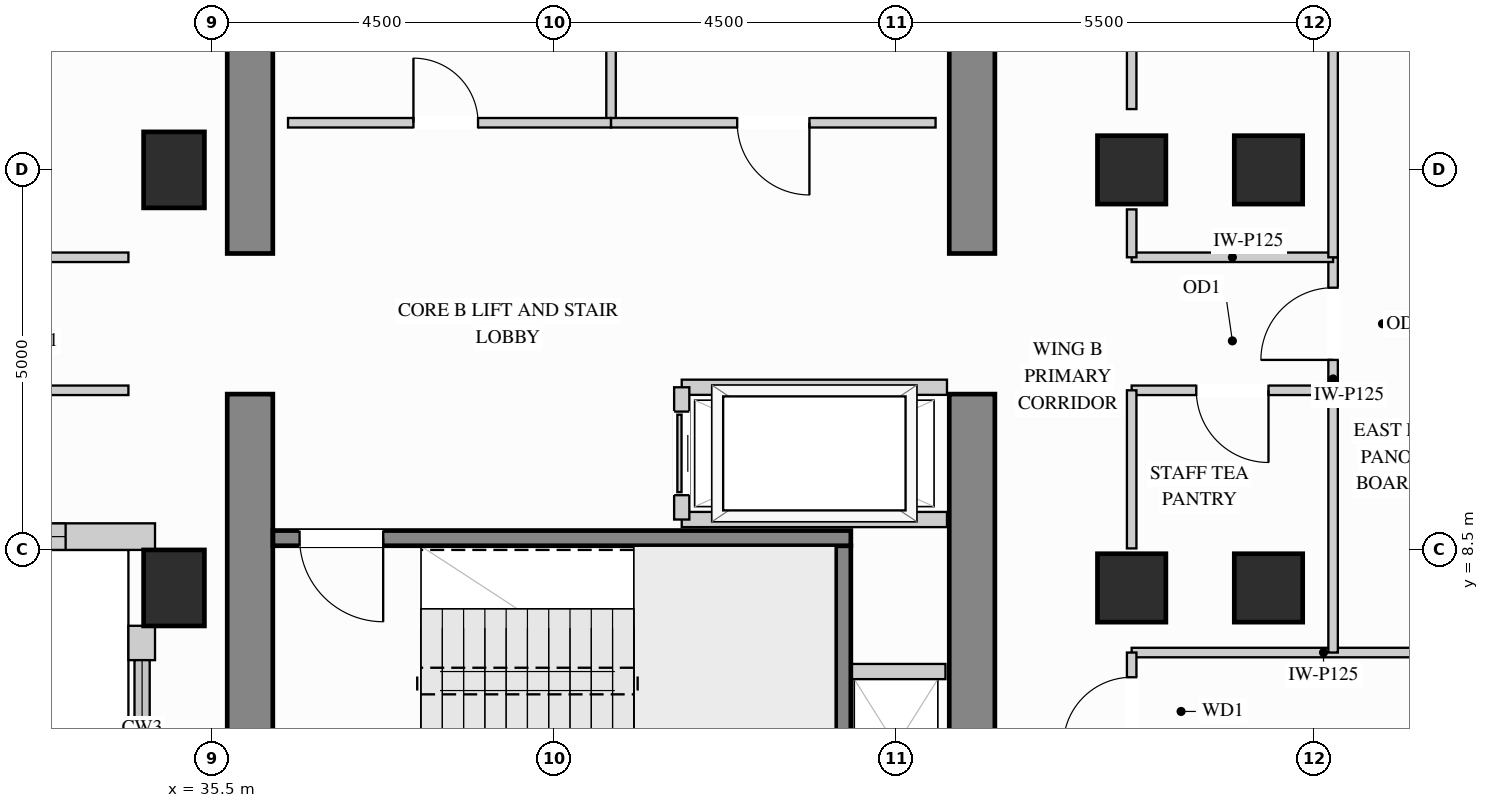
"""IFC4 building model, lengths in metres.
Left out: names, types, materials, properties, quantities, classifications, styles, units other than length and angle.
Written with IfcOpenShell. Run it as: python <this file> out.ifc"""

import sys

from ifc_helpers import new_model, si_unit, direction, frame, frame_2d, origin, origin_2d, place, context, subcontext, project, spatial, rectangle, extrude, source, transform, mapped, element, fill, save


model = new_model("IFC4")
c1 = context("Model", 3, precision=1e-05, world=origin(), true_north=direction((0.0, 1.0)))
c2 = subcontext(c1, "Body", "Model", "MODEL_VIEW")
j1 = project(units=[si_unit("LENGTHUNIT", "METRE"), si_unit("PLANEANGLEUNIT", "RADIAN")], contexts=[c1])
p1 = place(None, origin())
s1 = spatial("IfcSite", under=j1, at=p1, CompositionType="ELEMENT")
p2 = place(p1, origin())
s2 = spatial("IfcBuilding", under=s1, at=p2, CompositionType="ELEMENT")
p3 = place(p2, frame((0.0, 0.0, 161.1)))
s3 = spatial("IfcBuildingStorey", under=s2, at=p3, CompositionType="ELEMENT", Elevation=161.1)
m1 = source(origin(), c2, "Body", "SweptSolid", [
    extrude(rectangle(XDim=0.9, YDim=0.9, at=origin_2d()), origin(), (0.0, 0.0, 1.0), 3.4),
])
for number, where, z_axis, x_axis in (
    (1, (47.6, 13.5, 0.0), (0.0, 0.0, 1.0), (1.0, 0.0, 0.0)),
    (2, (47.6, 8.0, 0.0), (0.0, 0.0, 1.0), (1.0, 0.0, 0.0)),
    (3, (49.4, 13.5, 0.0), (0.0, 0.0, 1.0), (1.0, 0.0, 0.0)),
    (4, (49.4, 8.0, 0.0), (0.0, 0.0, 1.0), (1.0, 0.0, 0.0)),
):
    element("IfcColumn", number, at=place(p3, frame(where, z_axis=z_axis, x_axis=x_axis)), inside=s3, PredefinedType="COLUMN", context=c2, shape_type="MappedRepresentation", body=[
        mapped(m1, transform((0.0, 0.0, 0.0), x_axis=(1.0, 0.0, 0.0), y_axis=(0.0, 1.0, 0.0), z_axis=(0.0, 0.0, 1.0))),
    ])
m2 = source(origin(), c2, "Body", "SweptSolid", [
    extrude(rectangle(XDim=0.8, YDim=1.0, at=origin_2d()), origin(), (0.0, 0.0, 1.0), 3.4),
])
for number, where, z_axis, x_axis in (
    (5, (35.0, 13.5, 0.0), (0.0, 0.0, 1.0), (1.0, 0.0, 0.0)),
    (6, (35.0, 8.0, 0.0), (0.0, 0.0, 1.0), (1.0, 0.0, 0.0)),
):
    element("IfcColumn", number, at=place(p3, frame(where, z_axis=z_axis, x_axis=x_axis)), inside=s3, PredefinedType="COLUMN", context=c2, shape_type="MappedRepresentation", body=[
        mapped(m2, transform((0.0, 0.0, 0.0), x_axis=(1.0, 0.0, 0.0), y_axis=(0.0, 1.0, 0.0), z_axis=(0.0, 0.0, 1.0))),
    ])
m3 = source(origin(), c2, "Body", "SweptSolid", [
    extrude(rectangle(XDim=5.75, YDim=0.6, at=frame_2d((2.875, 0.0))), origin(), (0.0, 0.0, 1.0), 3.4),
])
p4 = place(p3, frame((45.5, 4.8, 0.0), z_axis=(0.0, 0.0, 1.0), x_axis=(0.0, 1.0, 0.0)))
e7 = element("IfcWall", 7, at=p4, inside=s3, PredefinedType="SHEAR", context=c2, shape_type="MappedRepresentation", body=[
    mapped(m3, transform((0.0, 0.0, 0.0), x_axis=(1.0, 0.0, 0.0), y_axis=(0.0, 1.0, 0.0), z_axis=(0.0, 0.0, 1.0))),
])
m4 = source(origin(), c2, "Body", "SweptSolid", [
    extrude(rectangle(XDim=3.8, YDim=0.6, at=frame_2d((1.9, 0.0))), origin(), (0.0, 0.0, 1.0), 3.4),
])
p5 = place(p3, frame((45.5, 12.4, 0.0), z_axis=(0.0, 0.0, 1.0), x_axis=(0.0, 1.0, 0.0)))
e8 = element("IfcWall", 8, at=p5, inside=s3, PredefinedType="SHEAR", context=c2, shape_type="MappedRepresentation", body=[
    mapped(m4, transform((0.0, 0.0, 0.0), x_axis=(1.0, 0.0, 0.0), y_axis=(0.0, 1.0, 0.0), z_axis=(0.0, 0.0, 1.0))),
])
p6 = place(p3, frame((36.0, 4.8, 0.0), z_axis=(0.0, 0.0, 1.0), x_axis=(0.0, 1.0, 0.0)))
e9 = element("IfcWall", 9, at=p6, inside=s3, PredefinedType="SHEAR", context=c2, shape_type="MappedRepresentation", body=[
    mapped(m3, transform((0.0, 0.0, 0.0), x_axis=(1.0, 0.0, 0.0), y_axis=(0.0, 1.0, 0.0), z_axis=(0.0, 0.0, 1.0))),
])
p7 = place(p3, frame((36.0, 12.4, 0.0), z_axis=(0.0, 0.0, 1.0), x_axis=(0.0, 1.0, 0.0)))
e10 = element("IfcWall", 10, at=p7, inside=s3, PredefinedType="SHEAR", context=c2, shape_type="MappedRepresentation", body=[
    mapped(m4, transform((0.0, 0.0, 0.0), x_axis=(1.0, 0.0, 0.0), y_axis=(0.0, 1.0, 0.0), z_axis=(0.0, 0.0, 1.0))),
])
p8 = place(p3, frame((30.898, 8.675, 0.0), z_axis=(0.0, 0.0, 1.0), x_axis=(1.0, 0.0, 0.0)))
e11 = element("IfcWall", 11, at=p8, inside=s3, PredefinedType="SOLIDWALL", context=c2, shape_type="SweptSolid", body=[
    extrude(rectangle(XDim=3.852, YDim=0.35, at=frame_2d((1.926, 0.0))), origin(), (0.0, 0.0, 1.0), 3.385),
])
p9 = place(p8, frame((1.176, 0.0, 0.78)))
e12 = element("IfcOpeningElement", 12, at=p9, cuts=e11, PredefinedType="OPENING", context=c2, shape_type="SweptSolid", body=[
    extrude(rectangle(XDim=1.5, YDim=2.0, at=frame_2d((0.75, 1.0))), frame((0.0, 0.185, 0.0), z_axis=(0.0, -1.0, 0.0), x_axis=(1.0, 0.0, 0.0)), (0.0, 0.0, 1.0), 0.37),
])
m5 = source(origin(), c2, "Body", "SweptSolid", [
    extrude(rectangle(XDim=0.452, YDim=0.35, at=frame_2d((0.226, 0.0))), origin(), (0.0, 0.0, 1.0), 2.612),
])
p10 = place(p3, frame((34.575, 7.502, 0.0), z_axis=(0.0, 0.0, 1.0), x_axis=(0.0, -1.0, 0.0)))
e13 = element("IfcWall", 13, at=p10, inside=s3, PredefinedType="SOLIDWALL", context=c2, shape_type="MappedRepresentation", body=[
    mapped(m5, transform((0.0, 0.0, 0.0), x_axis=(1.0, 0.0, 0.0), y_axis=(0.0, 1.0, 0.0), z_axis=(0.0, 0.0, 1.0))),
])
m6 = source(origin(), c2, "Body", "SweptSolid", [
    extrude(rectangle(XDim=1.93, YDim=0.125, at=frame_2d((0.965, 0.0))), origin(), (0.0, 0.0, 1.0), 3.385),
])
p11 = place(p3, frame((40.75, 14.12, 0.0), z_axis=(0.0, 0.0, 1.0), x_axis=(0.0, 1.0, 0.0)))
e14 = element("IfcWall", 14, at=p11, inside=s3, PredefinedType="PARTITIONING", context=c2, shape_type="MappedRepresentation", body=[
    mapped(m6, transform((0.0, 0.0, 0.0), x_axis=(1.0, 0.0, 0.0), y_axis=(0.0, 1.0, 0.0), z_axis=(0.0, 0.0, 1.0))),
])
p12 = place(p3, frame((36.5, 14.12, 0.0), z_axis=(0.0, 0.0, 1.0), x_axis=(1.0, 0.0, 0.0)))
e15 = element("IfcWall", 15, at=p12, inside=s3, PredefinedType="PARTITIONING", context=c2, shape_type="SweptSolid", body=[
    extrude(rectangle(XDim=4.25, YDim=0.125, at=frame_2d((2.125, 0.0))), origin(), (0.0, 0.0, 1.0), 3.385),
])
p13 = place(p12, frame((1.65, 0.0, 0.0)))
e16 = element("IfcOpeningElement", 16, at=p13, cuts=e15, PredefinedType="OPENING", context=c2, shape_type="SweptSolid", body=[
    extrude(rectangle(XDim=0.85, YDim=2.1, at=frame_2d((0.425, 1.05))), frame((0.0, 0.073, 0.0), z_axis=(0.0, -1.0, 0.0), x_axis=(1.0, 0.0, 0.0)), (0.0, 0.0, 1.0), 0.145),
])
p14 = place(p3, frame((40.75, 14.12, 0.0), z_axis=(0.0, 0.0, 1.0), x_axis=(1.0, 0.0, 0.0)))
e17 = element("IfcWall", 17, at=p14, inside=s3, PredefinedType="PARTITIONING", context=c2, shape_type="SweptSolid", body=[
    extrude(rectangle(XDim=4.27, YDim=0.125, at=frame_2d((2.135, 0.0))), origin(), (0.0, 0.0, 1.0), 3.385),
])
p15 = place(p14, frame((1.66, 0.0, 0.0)))
e18 = element("IfcOpeningElement", 18, at=p15, cuts=e17, PredefinedType="OPENING", context=c2, shape_type="SweptSolid", body=[
    extrude(rectangle(XDim=0.95, YDim=2.15, at=frame_2d((0.475, 1.075))), frame((0.0, 0.073, 0.0), z_axis=(0.0, -1.0, 0.0), x_axis=(1.0, 0.0, 0.0)), (0.0, 0.0, 1.0), 0.145),
])
p16 = place(p3, frame((50.25, 10.6, 0.0), z_axis=(0.0, 0.0, 1.0), x_axis=(0.0, 1.0, 0.0)))
e19 = element("IfcWall", 19, at=p16, inside=s3, PredefinedType="PARTITIONING", context=c2, shape_type="SweptSolid", body=[
    extrude(rectangle(XDim=1.75, YDim=0.125, at=frame_2d((0.875, 0.0))), origin(), (0.0, 0.0, 1.0), 3.385),
])
p17 = place(p16, frame((0.4, 0.0, 0.0)))
e20 = element("IfcOpeningElement", 20, at=p17, cuts=e19, PredefinedType="OPENING", context=c2, shape_type="SweptSolid", body=[
    extrude(rectangle(XDim=0.95, YDim=2.15, at=frame_2d((0.475, 1.075))), frame((0.0, 0.073, 0.0), z_axis=(0.0, -1.0, 0.0), x_axis=(1.0, 0.0, 0.0)), (0.0, 0.0, 1.0), 0.145),
])
m7 = source(origin(), c2, "Body", "SweptSolid", [
    extrude(rectangle(XDim=5.048, YDim=0.125, at=frame_2d((2.524, 0.0))), origin(), (0.0, 0.0, 1.0), 3.385),
])
p18 = place(p3, frame((47.6, 7.15, 0.0), z_axis=(0.0, 0.0, 1.0), x_axis=(1.0, 0.0, 0.0)))
e21 = element("IfcWall", 21, at=p18, inside=s3, PredefinedType="PARTITIONING", context=c2, shape_type="MappedRepresentation", body=[
    mapped(m7, transform((0.0, 0.0, 0.0), x_axis=(1.0, 0.0, 0.0), y_axis=(0.0, 1.0, 0.0), z_axis=(0.0, 0.0, 1.0))),
])
m8 = source(origin(), c2, "Body", "SweptSolid", [
    extrude(rectangle(XDim=2.65, YDim=0.125, at=frame_2d((1.325, 0.0))), origin(), (0.0, 0.0, 1.0), 3.385),
])
p19 = place(p3, frame((47.6, 12.35, 0.0), z_axis=(0.0, 0.0, 1.0), x_axis=(1.0, 0.0, 0.0)))
e22 = element("IfcWall", 22, at=p19, inside=s3, PredefinedType="PARTITIONING", context=c2, shape_type="MappedRepresentation", body=[
    mapped(m8, transform((0.0, 0.0, 0.0), x_axis=(1.0, 0.0, 0.0), y_axis=(0.0, 1.0, 0.0), z_axis=(0.0, 0.0, 1.0))),
])
p20 = place(p3, frame((47.6, 10.6, 0.0), z_axis=(0.0, 0.0, 1.0), x_axis=(1.0, 0.0, 0.0)))
e23 = element("IfcWall", 23, at=p20, inside=s3, PredefinedType="PARTITIONING", context=c2, shape_type="SweptSolid", body=[
    extrude(rectangle(XDim=2.65, YDim=0.125, at=frame_2d((1.325, 0.0))), origin(), (0.0, 0.0, 1.0), 2.773),
])
p21 = place(p20, frame((0.85, 0.0, 0.0)))
e24 = element("IfcOpeningElement", 24, at=p21, cuts=e23, PredefinedType="OPENING", context=c2, shape_type="SweptSolid", body=[
    extrude(rectangle(XDim=0.95, YDim=2.15, at=frame_2d((0.475, 1.075))), frame((0.0, 0.073, 0.0), z_axis=(0.0, -1.0, 0.0), x_axis=(1.0, 0.0, 0.0)), (0.0, 0.0, 1.0), 0.145),
])
m9 = source(origin(), c2, "Body", "SweptSolid", [
    extrude(rectangle(XDim=3.45, YDim=0.125, at=frame_2d((1.725, 0.0))), origin(), (0.0, 0.0, 1.0), 3.385),
])
p22 = place(p3, frame((50.25, 7.15, 0.0), z_axis=(0.0, 0.0, 1.0), x_axis=(0.0, 1.0, 0.0)))
e25 = element("IfcWall", 25, at=p22, inside=s3, PredefinedType="PARTITIONING", context=c2, shape_type="MappedRepresentation", body=[
    mapped(m9, transform((0.0, 0.0, 0.0), x_axis=(1.0, 0.0, 0.0), y_axis=(0.0, 1.0, 0.0), z_axis=(0.0, 0.0, 1.0))),
])
m10 = source(origin(), c2, "Body", "SweptSolid", [
    extrude(rectangle(XDim=2.798, YDim=0.125, at=frame_2d((1.399, 0.0))), origin(), (0.0, 0.0, 1.0), 3.385),
])
p23 = place(p3, frame((50.25, 12.35, 0.0), z_axis=(0.0, 0.0, 1.0), x_axis=(0.0, 1.0, 0.0)))
e26 = element("IfcWall", 26, at=p23, inside=s3, PredefinedType="PARTITIONING", context=c2, shape_type="MappedRepresentation", body=[
    mapped(m10, transform((0.0, 0.0, 0.0), x_axis=(1.0, 0.0, 0.0), y_axis=(0.0, 1.0, 0.0), z_axis=(0.0, 0.0, 1.0))),
])
m11 = source(origin(), c2, "Body", "SweptSolid", [
    extrude(rectangle(XDim=2.08, YDim=0.125, at=frame_2d((1.04, 0.0))), origin(), (0.0, 0.0, 1.0), 2.773),
])
p24 = place(p3, frame((47.6, 8.52, 0.0), z_axis=(0.0, 0.0, 1.0), x_axis=(0.0, 1.0, 0.0)))
e27 = element("IfcWall", 27, at=p24, inside=s3, PredefinedType="PARTITIONING", context=c2, shape_type="MappedRepresentation", body=[
    mapped(m11, transform((0.0, 0.0, 0.0), x_axis=(1.0, 0.0, 0.0), y_axis=(0.0, 1.0, 0.0), z_axis=(0.0, 0.0, 1.0))),
])
p25 = place(p3, frame((47.6, 14.3, 0.0), z_axis=(0.0, 0.0, 1.0), x_axis=(0.0, 1.0, 0.0)))
e28 = element("IfcWall", 28, at=p25, inside=s3, PredefinedType="PARTITIONING", context=c2, shape_type="SweptSolid", body=[
    extrude(rectangle(XDim=2.58, YDim=0.125, at=frame_2d((1.29, 0.0))), origin(), (0.0, 0.0, 1.0), 2.773),
])
p26 = place(p25, frame((1.2, 0.0, 0.0)))
e29 = element("IfcOpeningElement", 29, at=p26, cuts=e28, PredefinedType="OPENING", context=c2, shape_type="SweptSolid", body=[
    extrude(rectangle(XDim=0.95, YDim=2.15, at=frame_2d((0.475, 1.075))), frame((0.0, 0.073, 0.0), z_axis=(0.0, -1.0, 0.0), x_axis=(1.0, 0.0, 0.0)), (0.0, 0.0, 1.0), 0.145),
])
m12 = source(origin(), c2, "Body", "SweptSolid", [
    extrude(rectangle(XDim=0.63, YDim=0.125, at=frame_2d((0.315, 0.0))), origin(), (0.0, 0.0, 1.0), 2.773),
])
p27 = place(p3, frame((47.6, 12.35, 0.0), z_axis=(0.0, 0.0, 1.0), x_axis=(0.0, 1.0, 0.0)))
e30 = element("IfcWall", 30, at=p27, inside=s3, PredefinedType="PARTITIONING", context=c2, shape_type="MappedRepresentation", body=[
    mapped(m12, transform((0.0, 0.0, 0.0), x_axis=(1.0, 0.0, 0.0), y_axis=(0.0, 1.0, 0.0), z_axis=(0.0, 0.0, 1.0))),
])
p28 = place(p3, frame((47.6, 5.65, 0.0), z_axis=(0.0, 0.0, 1.0), x_axis=(0.0, 1.0, 0.0)))
e31 = element("IfcWall", 31, at=p28, inside=s3, PredefinedType="PARTITIONING", context=c2, shape_type="SweptSolid", body=[
    extrude(rectangle(XDim=1.5, YDim=0.125, at=frame_2d((0.75, 0.0))), origin(), (0.0, 0.0, 1.0), 2.773),
])
p29 = place(p28, frame((0.275, 0.0, 0.0)))
e32 = element("IfcOpeningElement", 32, at=p29, cuts=e31, PredefinedType="OPENING", context=c2, shape_type="SweptSolid", body=[
    extrude(rectangle(XDim=0.9, YDim=2.15, at=frame_2d((0.45, 1.075))), frame((0.0, 0.073, 0.0), z_axis=(0.0, -1.0, 0.0), x_axis=(1.0, 0.0, 0.0)), (0.0, 0.0, 1.0), 0.145),
])
p30 = place(p3, frame((29.85, 12.35, 0.0), z_axis=(0.0, 0.0, 1.0), x_axis=(1.0, 0.0, 0.0)))
e33 = element("IfcWall", 33, at=p30, inside=s3, PredefinedType="PARTITIONING", context=c2, shape_type="SweptSolid", body=[
    extrude(rectangle(XDim=4.55, YDim=0.125, at=frame_2d((2.275, 0.0))), origin(), (0.0, 0.0, 1.0), 3.385),
])
p31 = place(p30, frame((1.8, 0.0, 0.0)))
e34 = element("IfcOpeningElement", 34, at=p31, cuts=e33, PredefinedType="OPENING", context=c2, shape_type="SweptSolid", body=[
    extrude(rectangle(XDim=0.95, YDim=2.15, at=frame_2d((0.475, 1.075))), frame((0.0, 0.073, 0.0), z_axis=(0.0, -1.0, 0.0), x_axis=(1.0, 0.0, 0.0)), (0.0, 0.0, 1.0), 0.145),
])
p32 = place(p3, frame((29.85, 10.6, 0.0), z_axis=(0.0, 0.0, 1.0), x_axis=(1.0, 0.0, 0.0)))
e35 = element("IfcWall", 35, at=p32, inside=s3, PredefinedType="PARTITIONING", context=c2, shape_type="SweptSolid", body=[
    extrude(rectangle(XDim=4.55, YDim=0.125, at=frame_2d((2.275, 0.0))), origin(), (0.0, 0.0, 1.0), 3.385),
])
p33 = place(p32, frame((1.8, 0.0, 0.0)))
e36 = element("IfcOpeningElement", 36, at=p33, cuts=e35, PredefinedType="OPENING", context=c2, shape_type="SweptSolid", body=[
    extrude(rectangle(XDim=0.95, YDim=2.15, at=frame_2d((0.475, 1.075))), frame((0.0, 0.073, 0.0), z_axis=(0.0, -1.0, 0.0), x_axis=(1.0, 0.0, 0.0)), (0.0, 0.0, 1.0), 0.145),
])
m13 = source(origin(), c2, "Body", "SweptSolid", [
    extrude(rectangle(XDim=1.3, YDim=0.2, at=frame_2d((0.65, 0.0))), origin(), (0.0, 0.0, 1.0), 3.385),
])
p34 = place(p3, frame((43.85, 6.9, 0.0), z_axis=(0.0, 0.0, 1.0), x_axis=(1.0, 0.0, 0.0)))
e37 = element("IfcWall", 37, at=p34, inside=s3, PredefinedType="PARTITIONING", context=c2, shape_type="MappedRepresentation", body=[
    mapped(m13, transform((0.0, 0.0, 0.0), x_axis=(1.0, 0.0, 0.0), y_axis=(0.0, 1.0, 0.0), z_axis=(0.0, 0.0, 1.0))),
])
m14 = source(origin(), c2, "Body", "SweptSolid", [
    extrude(rectangle(XDim=3.49, YDim=0.2, at=frame_2d((1.745, 0.0))), origin(), (0.0, 0.0, 1.0), 3.385),
])
for number, where, z_axis, x_axis in (
    (38, (41.68, 10.64, 0.0), (0.0, 0.0, 1.0), (1.0, 0.0, 0.0)),
    (39, (41.68, 8.9, 0.0), (0.0, 0.0, 1.0), (1.0, 0.0, 0.0)),
):
    element("IfcWall", number, at=place(p3, frame(where, z_axis=z_axis, x_axis=x_axis)), inside=s3, PredefinedType="PARTITIONING", context=c2, shape_type="MappedRepresentation", body=[
        mapped(m14, transform((0.0, 0.0, 0.0), x_axis=(1.0, 0.0, 0.0), y_axis=(0.0, 1.0, 0.0), z_axis=(0.0, 0.0, 1.0))),
    ])
p35 = place(p3, frame((41.68, 8.9, 0.0), z_axis=(0.0, 0.0, 1.0), x_axis=(0.0, 1.0, 0.0)))
e40 = element("IfcWall", 40, at=p35, inside=s3, PredefinedType="PARTITIONING", context=c2, shape_type="SweptSolid", body=[
    extrude(rectangle(XDim=1.74, YDim=0.2, at=frame_2d((0.87, 0.0))), origin(), (0.0, 0.0, 1.0), 3.385),
])
p36 = place(p35, frame((0.32, 0.0, 0.0)))
e41 = element("IfcOpeningElement", 41, at=p36, cuts=e40, PredefinedType="OPENING", context=c2, shape_type="SweptSolid", body=[
    extrude(rectangle(XDim=1.1, YDim=2.2, at=frame_2d((0.55, 1.1))), frame((0.0, 0.11, 0.0), z_axis=(0.0, -1.0, 0.0), x_axis=(1.0, 0.0, 0.0)), (0.0, 0.0, 1.0), 0.22),
])
m15 = source(origin(), c2, "Body", "SweptSolid", [
    extrude(rectangle(XDim=3.753, YDim=0.2, at=frame_2d((1.876, 0.0))), origin(), (0.0, 0.0, 1.0), 3.4),
])
p37 = place(p3, frame((43.805, 4.802, 0.0), z_axis=(0.0, 0.0, 1.0), x_axis=(0.0, 1.0, 0.0)))
e42 = element("IfcWall", 42, at=p37, inside=s3, PredefinedType="SHEAR", context=c2, shape_type="MappedRepresentation", body=[
    mapped(m15, transform((0.0, 0.0, 0.0), x_axis=(1.0, 0.0, 0.0), y_axis=(0.0, 1.0, 0.0), z_axis=(0.0, 0.0, 1.0))),
])
p38 = place(p3, frame((36.302, 8.655, 0.0), z_axis=(0.0, 0.0, 1.0), x_axis=(1.0, 0.0, 0.0)))
e43 = element("IfcWall", 43, at=p38, inside=s3, PredefinedType="SHEAR", context=c2, shape_type="SweptSolid", body=[
    extrude(rectangle(XDim=7.603, YDim=0.2, at=frame_2d((3.802, 0.0))), origin(), (0.0, 0.0, 1.0), 3.4),
])
p39 = place(p38, frame((0.35, 0.0, 0.0)))
e44 = element("IfcOpeningElement", 44, at=p39, cuts=e43, PredefinedType="OPENING", context=c2, shape_type="SweptSolid", body=[
    extrude(rectangle(XDim=1.1, YDim=2.15, at=frame_2d((0.55, 1.075))), frame((0.0, 0.11, 0.0), z_axis=(0.0, -1.0, 0.0), x_axis=(1.0, 0.0, 0.0)), (0.0, 0.0, 1.0), 0.22),
])
m16 = source(origin(), c2, "Body", "SweptSolid", [
    extrude(rectangle(XDim=1.1, YDim=2.2, at=frame_2d((0.55, 1.1))), frame((0.0, 0.025, 0.0), z_axis=(0.0, -1.0, 0.0), x_axis=(1.0, 0.0, 0.0)), (0.0, 0.0, 1.0), 0.05),
])
p40 = place(p36, origin())
e45 = element("IfcDoor", 45, at=p40, inside=s3, OperationType="SLIDING_TO_LEFT", PredefinedType="DOOR", context=c2, shape_type="MappedRepresentation", body=[
    mapped(m16, transform((0.0, 0.0, 0.0), x_axis=(1.0, 0.0, 0.0), y_axis=(0.0, 1.0, 0.0), z_axis=(0.0, 0.0, 1.0))),
])
fill(e41, e45)
m17 = source(origin(), c2, "Body", "SweptSolid", [
    extrude(rectangle(XDim=0.95, YDim=2.15, at=frame_2d((0.475, 1.075))), frame((0.0, 0.025, 0.0), z_axis=(0.0, -1.0, 0.0), x_axis=(1.0, 0.0, 0.0)), (0.0, 0.0, 1.0), 0.05),
])
p41 = place(p15, origin())
e46 = element("IfcDoor", 46, at=p41, inside=s3, OperationType="SINGLE_SWING_RIGHT", PredefinedType="DOOR", context=c2, shape_type="MappedRepresentation", body=[
    mapped(m17, transform((0.0, 0.0, 0.0), x_axis=(1.0, 0.0, 0.0), y_axis=(0.0, 1.0, 0.0), z_axis=(0.0, 0.0, 1.0))),
])
fill(e18, e46)
p42 = place(p21, origin())
e47 = element("IfcDoor", 47, at=p42, inside=s3, OperationType="SINGLE_SWING_RIGHT", PredefinedType="DOOR", context=c2, shape_type="MappedRepresentation", body=[
    mapped(m17, transform((0.0, 0.0, 0.0), x_axis=(1.0, 0.0, 0.0), y_axis=(0.0, 1.0, 0.0), z_axis=(0.0, 0.0, 1.0))),
])
fill(e24, e47)
p43 = place(p17, origin())
e48 = element("IfcDoor", 48, at=p43, inside=s3, OperationType="SINGLE_SWING_LEFT", PredefinedType="DOOR", context=c2, shape_type="MappedRepresentation", body=[
    mapped(m17, transform((0.0, 0.0, 0.0), x_axis=(1.0, 0.0, 0.0), y_axis=(0.0, 1.0, 0.0), z_axis=(0.0, 0.0, 1.0))),
])
fill(e20, e48)
m18 = source(origin(), c2, "Body", "SweptSolid", [
    extrude(rectangle(XDim=0.85, YDim=2.1, at=frame_2d((0.425, 1.05))), frame((0.0, 0.025, 0.0), z_axis=(0.0, -1.0, 0.0), x_axis=(1.0, 0.0, 0.0)), (0.0, 0.0, 1.0), 0.05),
])
p44 = place(p13, origin())
e49 = element("IfcDoor", 49, at=p44, inside=s3, OperationType="SINGLE_SWING_LEFT", PredefinedType="DOOR", context=c2, shape_type="MappedRepresentation", body=[
    mapped(m18, transform((0.0, 0.0, 0.0), x_axis=(1.0, 0.0, 0.0), y_axis=(0.0, 1.0, 0.0), z_axis=(0.0, 0.0, 1.0))),
])
fill(e16, e49)
m19 = source(origin(), c2, "Body", "SweptSolid", [
    extrude(rectangle(XDim=1.1, YDim=2.15, at=frame_2d((0.55, 1.075))), frame((0.0, 0.025, 0.0), z_axis=(0.0, -1.0, 0.0), x_axis=(1.0, 0.0, 0.0)), (0.0, 0.0, 1.0), 0.05),
])
p45 = place(p39, origin())
e50 = element("IfcDoor", 50, at=p45, inside=s3, OperationType="SINGLE_SWING_RIGHT", PredefinedType="DOOR", context=c2, shape_type="MappedRepresentation", body=[
    mapped(m19, transform((0.0, 0.0, 0.0), x_axis=(1.0, 0.0, 0.0), y_axis=(0.0, 1.0, 0.0), z_axis=(0.0, 0.0, 1.0))),
])
fill(e44, e50)
m20 = source(origin(), c2, "Body", "SweptSolid", [
    extrude(rectangle(XDim=0.9, YDim=2.15, at=frame_2d((0.45, 1.075))), frame((0.0, 0.025, 0.0), z_axis=(0.0, -1.0, 0.0), x_axis=(1.0, 0.0, 0.0)), (0.0, 0.0, 1.0), 0.05),
])
p46 = place(p29, origin())
e51 = element("IfcDoor", 51, at=p46, inside=s3, OperationType="SINGLE_SWING_LEFT", PredefinedType="DOOR", context=c2, shape_type="MappedRepresentation", body=[
    mapped(m20, transform((0.0, 0.0, 0.0), x_axis=(1.0, 0.0, 0.0), y_axis=(0.0, 1.0, 0.0), z_axis=(0.0, 0.0, 1.0))),
])
fill(e32, e51)
m21 = source(origin(), c2, "Body", "SweptSolid", [
    extrude(rectangle(XDim=1.5, YDim=2.0, at=frame_2d((0.75, 1.0))), frame((0.0, 0.03, 0.0), z_axis=(0.0, -1.0, 0.0), x_axis=(1.0, 0.0, 0.0)), (0.0, 0.0, 1.0), 0.06),
])
p47 = place(p9, origin())
e52 = element("IfcWindow", 52, at=p47, inside=s3, PartitioningType="SINGLE_PANEL", PredefinedType="WINDOW", context=c2, shape_type="MappedRepresentation", body=[
    mapped(m21, transform((0.0, 0.0, 0.0), x_axis=(1.0, 0.0, 0.0), y_axis=(0.0, 1.0, 0.0), z_axis=(0.0, 0.0, 1.0))),
])
fill(e12, e52)
save(model, sys.argv[1])
